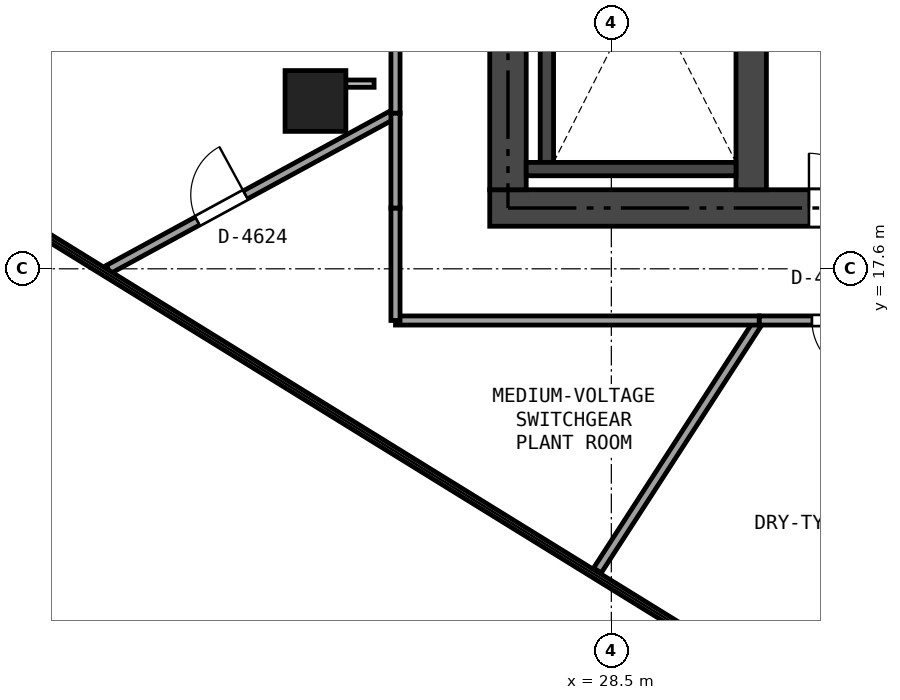
"""IFC4 building model, lengths in metres.
Left out: names, types, materials, properties, quantities, classifications, styles, units other than length and angle.
Written with IfcOpenShell. Run it as: python <this file> out.ifc"""

import sys

from ifc_helpers import new_model, si_unit, direction, frame, frame_2d, origin, origin_2d, place, context, subcontext, project, spatial, rectangle, extrude, element, fill, save


model = new_model("IFC4")
c1 = context("Model", 3, precision=1e-05, world=origin(), true_north=direction((0.0, 1.0)))
c2 = subcontext(c1, "Body", "Model", "MODEL_VIEW")
j1 = project(units=[si_unit("LENGTHUNIT", "METRE"), si_unit("PLANEANGLEUNIT", "RADIAN")], contexts=[c1])
p1 = place(None, origin())
s1 = spatial("IfcSite", under=j1, at=p1, CompositionType="ELEMENT")
p2 = place(p1, origin())
s2 = spatial("IfcBuilding", under=s1, at=p2, CompositionType="ELEMENT")
p3 = place(p2, frame((0.0, 0.0, 172.5)))
s3 = spatial("IfcBuildingStorey", under=s2, at=p3, CompositionType="ELEMENT", Elevation=172.5)
p4 = place(p3, frame((26.5, 18.6, 0.0), z_axis=(0.0, 0.0, 1.0), x_axis=(1.0, 0.0, 0.0)))
e1 = element("IfcWall", 1, at=p4, inside=s3, PredefinedType="SHEAR", context=c2, shape_type="SweptSolid", body=[
    extrude(rectangle(XDim=21.4, YDim=0.6, at=frame_2d((10.7, 0.0))), origin(), (0.0, 0.0, 1.0), 4.08),
])
p5 = place(p4, frame((12.425, 0.0, 0.0)))
e2 = element("IfcOpeningElement", 2, at=p5, cuts=e1, PredefinedType="OPENING", context=c2, shape_type="SweptSolid", body=[
    extrude(rectangle(XDim=1.15, YDim=2.15, at=frame_2d((0.575, 1.075))), frame((0.0, 0.31, 0.0), z_axis=(0.0, -1.0, 0.0), x_axis=(1.0, 0.0, 0.0)), (0.0, 0.0, 1.0), 0.62),
])
p6 = place(p4, frame((5.25, 0.0, 0.0)))
e3 = element("IfcOpeningElement", 3, at=p6, cuts=e1, PredefinedType="OPENING", context=c2, shape_type="SweptSolid", body=[
    extrude(rectangle(XDim=0.9, YDim=2.1, at=frame_2d((0.45, 1.05))), frame((0.0, 0.31, 0.0), z_axis=(0.0, -1.0, 0.0), x_axis=(1.0, 0.0, 0.0)), (0.0, 0.0, 1.0), 0.62),
])
p7 = place(p3, frame((26.8, 18.9, 0.0), z_axis=(0.0, 0.0, 1.0), x_axis=(0.0, 1.0, 0.0)))
e4 = element("IfcWall", 4, at=p7, inside=s3, PredefinedType="SHEAR", context=c2, shape_type="SweptSolid", body=[
    extrude(rectangle(XDim=15.0, YDim=0.6, at=frame_2d((7.5, 0.0))), origin(), (0.0, 0.0, 1.0), 4.08),
])
p8 = place(p7, frame((4.6, 0.0, 0.02)))
e5 = element("IfcOpeningElement", 5, at=p8, cuts=e4, PredefinedType="OPENING", context=c2, shape_type="SweptSolid", body=[
    extrude(rectangle(XDim=0.9, YDim=2.02, at=frame_2d((0.45, 1.01))), frame((0.0, 0.31, 0.0), z_axis=(0.0, -1.0, 0.0), x_axis=(1.0, 0.0, 0.0)), (0.0, 0.0, 1.0), 0.62),
])
p9 = place(p3, frame((30.8, 18.9, 0.0), z_axis=(0.0, 0.0, 1.0), x_axis=(0.0, 1.0, 0.0)))
e6 = element("IfcWall", 6, at=p9, inside=s3, PredefinedType="SHEAR", context=c2, shape_type="SweptSolid", body=[
    extrude(rectangle(XDim=15.0, YDim=0.5, at=frame_2d((7.5, 0.0))), origin(), (0.0, 0.0, 1.0), 4.08),
])
p10 = place(p9, frame((6.6, 0.0, 0.0)))
e7 = element("IfcOpeningElement", 7, at=p10, cuts=e6, PredefinedType="OPENING", context=c2, shape_type="SweptSolid", body=[
    extrude(rectangle(XDim=1.1, YDim=2.15, at=frame_2d((0.55, 1.075))), frame((0.0, 0.26, 0.0), z_axis=(0.0, -1.0, 0.0), x_axis=(1.0, 0.0, 0.0)), (0.0, 0.0, 1.0), 0.52),
])
p11 = place(p9, frame((8.4, 0.0, 0.0)))
e8 = element("IfcOpeningElement", 8, at=p11, cuts=e6, PredefinedType="OPENING", context=c2, shape_type="SweptSolid", body=[
    extrude(rectangle(XDim=0.9, YDim=2.1, at=frame_2d((0.45, 1.05))), frame((0.0, 0.26, 0.0), z_axis=(0.0, -1.0, 0.0), x_axis=(1.0, 0.0, 0.0)), (0.0, 0.0, 1.0), 0.52),
])
p12 = place(p3, frame((27.44, 19.35, 0.0), z_axis=(0.0, 0.0, 1.0), x_axis=(0.0, 1.0, 0.0)))
e9 = element("IfcWall", 9, at=p12, inside=s3, PredefinedType="SHEAR", context=c2, shape_type="SweptSolid", body=[
    extrude(rectangle(XDim=7.4, YDim=0.22, at=frame_2d((3.7, 0.0))), origin(), (0.0, 0.0, 1.0), 4.08),
])
p13 = place(p3, frame((27.1, 19.24, 0.0), z_axis=(0.0, 0.0, 1.0), x_axis=(1.0, 0.0, 0.0)))
e10 = element("IfcWall", 10, at=p13, inside=s3, PredefinedType="SHEAR", context=c2, shape_type="SweptSolid", body=[
    extrude(rectangle(XDim=3.45, YDim=0.22, at=frame_2d((1.725, 0.0))), origin(), (0.0, 0.0, 1.0), 4.08),
])
p14 = place(p3, frame((23.634, 20.36, 0.0), z_axis=(0.0, 0.0, 1.0), x_axis=(1.0, 0.0, 0.0)))
e11 = element("IfcColumn", 11, at=p14, inside=s3, PredefinedType="COLUMN", context=c2, shape_type="SweptSolid", body=[
    extrude(rectangle(XDim=1.0, YDim=1.0, at=origin_2d()), origin(), (0.0, 0.0, 1.0), 4.08),
])
p15 = place(p3, frame((20.228, 17.589, 0.0), z_axis=(0.0, 0.0, 1.0), x_axis=(0.878422694628, 0.47788447303, 0.0)))
e12 = element("IfcWall", 12, at=p15, inside=s3, PredefinedType="PARTITIONING", context=c2, shape_type="SweptSolid", body=[
    extrude(rectangle(XDim=5.375, YDim=0.15, at=frame_2d((2.688, 0.0))), origin(), (0.0, 0.0, 1.0), 3.565),
])
p16 = place(p15, frame((1.667, 0.0, 0.0)))
e13 = element("IfcOpeningElement", 13, at=p16, cuts=e12, PredefinedType="OPENING", context=c2, shape_type="SweptSolid", body=[
    extrude(rectangle(XDim=0.9, YDim=2.0, at=frame_2d((0.45, 1.0))), frame((0.0, 0.085, 0.0), z_axis=(0.0, -1.0, 0.0), x_axis=(1.0, 0.0, 0.0)), (0.0, 0.0, 1.0), 0.17),
])
p17 = place(p3, frame((24.95, 20.158, 0.0), z_axis=(0.0, 0.0, 1.0), x_axis=(0.0, 1.0, 0.0)))
e14 = element("IfcWall", 14, at=p17, inside=s3, PredefinedType="PARTITIONING", context=c2, shape_type="SweptSolid", body=[
    extrude(rectangle(XDim=6.884, YDim=0.15, at=frame_2d((3.442, 0.0))), origin(), (0.0, 0.0, 1.0), 3.065),
])
p18 = place(p17, frame((2.992, 0.0, 0.0)))
e15 = element("IfcOpeningElement", 15, at=p18, cuts=e14, PredefinedType="OPENING", context=c2, shape_type="SweptSolid", body=[
    extrude(rectangle(XDim=0.9, YDim=2.0, at=frame_2d((0.45, 1.0))), frame((0.0, 0.085, 0.0), z_axis=(0.0, -1.0, 0.0), x_axis=(1.0, 0.0, 0.0)), (0.0, 0.0, 1.0), 0.17),
])
p19 = place(p3, frame((28.271, 12.639, 0.0), z_axis=(0.0, 0.0, 1.0), x_axis=(0.543538538902, 0.839384212818, 0.0)))
e16 = element("IfcWall", 16, at=p19, inside=s3, PredefinedType="PARTITIONING", context=c2, shape_type="SweptSolid", body=[
    extrude(rectangle(XDim=4.898, YDim=0.15, at=frame_2d((2.449, 0.0))), origin(), (0.0, 0.0, 1.0), 3.565),
])
p20 = place(p3, frame((30.933, 16.75, 0.0), z_axis=(0.0, 0.0, 1.0), x_axis=(-1.0, 0.0, 0.0)))
e17 = element("IfcWall", 17, at=p20, inside=s3, PredefinedType="PARTITIONING", context=c2, shape_type="SweptSolid", body=[
    extrude(rectangle(XDim=5.983, YDim=0.15, at=frame_2d((2.992, 0.0))), origin(), (0.0, 0.0, 1.0), 3.565),
])
p21 = place(p3, frame((24.95, 16.75, 0.0), z_axis=(0.0, 0.0, 1.0), x_axis=(0.0, 1.0, 0.0)))
e18 = element("IfcWall", 18, at=p21, inside=s3, PredefinedType="PARTITIONING", context=c2, shape_type="SweptSolid", body=[
    extrude(rectangle(XDim=1.85, YDim=0.15, at=frame_2d((0.925, 0.0))), origin(), (0.0, 0.0, 1.0), 4.08),
])
p22 = place(p3, frame((24.95, 18.6, 0.0), z_axis=(0.0, 0.0, 1.0), x_axis=(0.0, 1.0, 0.0)))
e19 = element("IfcWall", 19, at=p22, inside=s3, PredefinedType="PARTITIONING", context=c2, shape_type="SweptSolid", body=[
    extrude(rectangle(XDim=1.558, YDim=0.15, at=frame_2d((0.779, 0.0))), origin(), (0.0, 0.0, 1.0), 3.565),
])
p23 = place(p3, frame((36.694, 16.75, 0.0), z_axis=(0.0, 0.0, 1.0), x_axis=(-1.0, 0.0, 0.0)))
e20 = element("IfcWall", 20, at=p23, inside=s3, PredefinedType="PARTITIONING", context=c2, shape_type="SweptSolid", body=[
    extrude(rectangle(XDim=5.761, YDim=0.15, at=frame_2d((2.88, 0.0))), origin(), (0.0, 0.0, 1.0), 3.065),
])
p24 = place(p23, frame((3.995, 0.0, 0.0)))
e21 = element("IfcOpeningElement", 21, at=p24, cuts=e20, PredefinedType="OPENING", context=c2, shape_type="SweptSolid", body=[
    extrude(rectangle(XDim=0.9, YDim=2.0, at=frame_2d((0.45, 1.0))), frame((0.0, 0.085, 0.0), z_axis=(0.0, -1.0, 0.0), x_axis=(1.0, 0.0, 0.0)), (0.0, 0.0, 1.0), 0.17),
])
p25 = place(p6, origin())
e22 = element("IfcDoor", 22, at=p25, inside=s3, OperationType="SINGLE_SWING_LEFT", PredefinedType="DOOR", context=c2, shape_type="SweptSolid", body=[
    extrude(rectangle(XDim=0.9, YDim=2.1, at=frame_2d((0.45, 1.05))), frame((0.0, 0.025, 0.0), z_axis=(0.0, -1.0, 0.0), x_axis=(1.0, 0.0, 0.0)), (0.0, 0.0, 1.0), 0.05),
])
fill(e3, e22)
p26 = place(p16, origin())
e23 = element("IfcDoor", 23, at=p26, inside=s3, OperationType="SINGLE_SWING_RIGHT", PredefinedType="DOOR", context=c2, shape_type="SweptSolid", body=[
    extrude(rectangle(XDim=0.9, YDim=2.0, at=frame_2d((0.45, 1.0))), frame((0.0, 0.025, 0.0), z_axis=(0.0, -1.0, 0.0), x_axis=(1.0, 0.0, 0.0)), (0.0, 0.0, 1.0), 0.05),
])
fill(e13, e23)
p27 = place(p24, origin())
e24 = element("IfcDoor", 24, at=p27, inside=s3, OperationType="SINGLE_SWING_LEFT", PredefinedType="DOOR", context=c2, shape_type="SweptSolid", body=[
    extrude(rectangle(XDim=0.9, YDim=2.0, at=frame_2d((0.45, 1.0))), frame((0.0, 0.025, 0.0), z_axis=(0.0, -1.0, 0.0), x_axis=(1.0, 0.0, 0.0)), (0.0, 0.0, 1.0), 0.05),
])
fill(e21, e24)
save(model, sys.argv[1])
